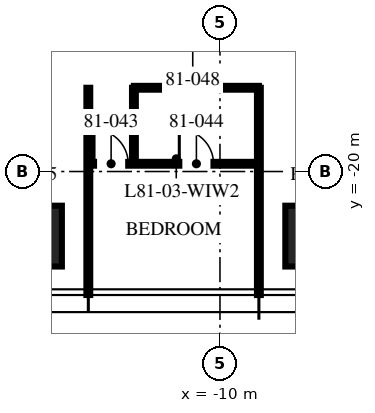
"""IFC4 building model, lengths in metres.
Left out: names, types, materials, properties, quantities, classifications, styles, units other than length and angle.
Written with IfcOpenShell. Run it as: python <this file> out.ifc"""

import sys

from ifc_helpers import new_model, si_unit, direction, frame, frame_2d, origin, origin_2d, place, context, subcontext, project, spatial, rectangle, extrude, element, fill, save


model = new_model("IFC4")
c1 = context("Model", 3, precision=1e-05, world=origin(), true_north=direction((0.0, 1.0)))
c2 = subcontext(c1, "Body", "Model", "MODEL_VIEW")
j1 = project(units=[si_unit("LENGTHUNIT", "METRE"), si_unit("PLANEANGLEUNIT", "RADIAN")], contexts=[c1])
p1 = place(None, origin())
s1 = spatial("IfcSite", under=j1, at=p1, CompositionType="ELEMENT")
p2 = place(p1, origin())
s2 = spatial("IfcBuilding", under=s1, at=p2, CompositionType="ELEMENT")
p3 = place(p2, frame((0.0, 0.0, 323.25)))
s3 = spatial("IfcBuildingStorey", under=s2, at=p3, CompositionType="ELEMENT", Elevation=323.25)
for number, where, z_axis, x_axis in (
    (1, (-7.48, -21.7, 0.0), (0.0, 0.0, 1.0), (1.0, 0.0, 0.0)),
    (2, (-14.96, -21.7, 0.0), (0.0, 0.0, 1.0), (1.0, 0.0, 0.0)),
):
    element("IfcColumn", number, at=place(p3, frame(where, z_axis=z_axis, x_axis=x_axis)), inside=s3, PredefinedType="COLUMN", context=c2, shape_type="SweptSolid", body=[
        extrude(rectangle(XDim=1.6, YDim=1.6, at=origin_2d()), origin(), (0.0, 0.0, 1.0), 3.75),
    ])
for number, where, z_axis, x_axis in (
    (3, (-13.464, -17.796, 0.0), (0.0, 0.0, 1.0), (0.0, -1.0, 0.0)),
    (4, (-8.976, -17.796, 0.0), (0.0, 0.0, 1.0), (0.0, -1.0, 0.0)),
):
    element("IfcWall", number, at=place(p3, frame(where, z_axis=z_axis, x_axis=x_axis)), inside=s3, PredefinedType="PARTITIONING", context=c2, shape_type="SweptSolid", body=[
        extrude(rectangle(XDim=5.454, YDim=0.1, at=frame_2d((2.727, 0.0))), origin(), (0.0, 0.0, 1.0), 3.01),
    ])
p4 = place(p3, frame((-13.464, -19.796, 0.0), z_axis=(0.0, 0.0, 1.0), x_axis=(1.0, 0.0, 0.0)))
e5 = element("IfcWall", 5, at=p4, inside=s3, PredefinedType="PARTITIONING", context=c2, shape_type="SweptSolid", body=[
    extrude(rectangle(XDim=4.488, YDim=0.1, at=frame_2d((2.244, 0.0))), origin(), (0.0, 0.0, 1.0), 2.91),
])
p5 = place(p4, frame((0.15, 0.0, 0.0)))
e6 = element("IfcOpeningElement", 6, at=p5, cuts=e5, PredefinedType="OPENING", context=c2, shape_type="SweptSolid", body=[
    extrude(rectangle(XDim=0.9, YDim=2.1, at=frame_2d((0.45, 1.05))), frame((0.0, 0.06, 0.0), z_axis=(0.0, -1.0, 0.0), x_axis=(1.0, 0.0, 0.0)), (0.0, 0.0, 1.0), 0.12),
])
p6 = place(p4, frame((2.394, 0.0, 0.0)))
e7 = element("IfcOpeningElement", 7, at=p6, cuts=e5, PredefinedType="OPENING", context=c2, shape_type="SweptSolid", body=[
    extrude(rectangle(XDim=0.9, YDim=2.1, at=frame_2d((0.45, 1.05))), frame((0.0, 0.06, 0.0), z_axis=(0.0, -1.0, 0.0), x_axis=(1.0, 0.0, 0.0)), (0.0, 0.0, 1.0), 0.12),
])
p7 = place(p3, frame((-12.264, -17.796, 0.0), z_axis=(0.0, 0.0, 1.0), x_axis=(0.0, -1.0, 0.0)))
e8 = element("IfcWall", 8, at=p7, inside=s3, PredefinedType="PARTITIONING", context=c2, shape_type="SweptSolid", body=[
    extrude(rectangle(XDim=2.0, YDim=0.1, at=frame_2d((1.0, 0.0))), origin(), (0.0, 0.0, 1.0), 3.5),
])
p8 = place(p3, frame((-12.264, -17.796, 0.0), z_axis=(0.0, 0.0, 1.0), x_axis=(1.0, 0.0, 0.0)))
e9 = element("IfcWall", 9, at=p8, inside=s3, PredefinedType="PARTITIONING", context=c2, shape_type="SweptSolid", body=[
    extrude(rectangle(XDim=3.288, YDim=0.1, at=frame_2d((1.644, 0.0))), origin(), (0.0, 0.0, 1.0), 2.91),
])
p9 = place(p5, origin())
e10 = element("IfcDoor", 10, at=p9, inside=s3, OperationType="SINGLE_SWING_LEFT", PredefinedType="DOOR", context=c2, shape_type="SweptSolid", body=[
    extrude(rectangle(XDim=0.9, YDim=2.1, at=frame_2d((0.45, 1.05))), frame((0.0, 0.025, 0.0), z_axis=(0.0, -1.0, 0.0), x_axis=(1.0, 0.0, 0.0)), (0.0, 0.0, 1.0), 0.05),
])
fill(e6, e10)
p10 = place(p6, origin())
e11 = element("IfcDoor", 11, at=p10, inside=s3, OperationType="SINGLE_SWING_LEFT", PredefinedType="DOOR", context=c2, shape_type="SweptSolid", body=[
    extrude(rectangle(XDim=0.9, YDim=2.1, at=frame_2d((0.45, 1.05))), frame((0.0, 0.025, 0.0), z_axis=(0.0, -1.0, 0.0), x_axis=(1.0, 0.0, 0.0)), (0.0, 0.0, 1.0), 0.05),
])
fill(e7, e11)
save(model, sys.argv[1])
